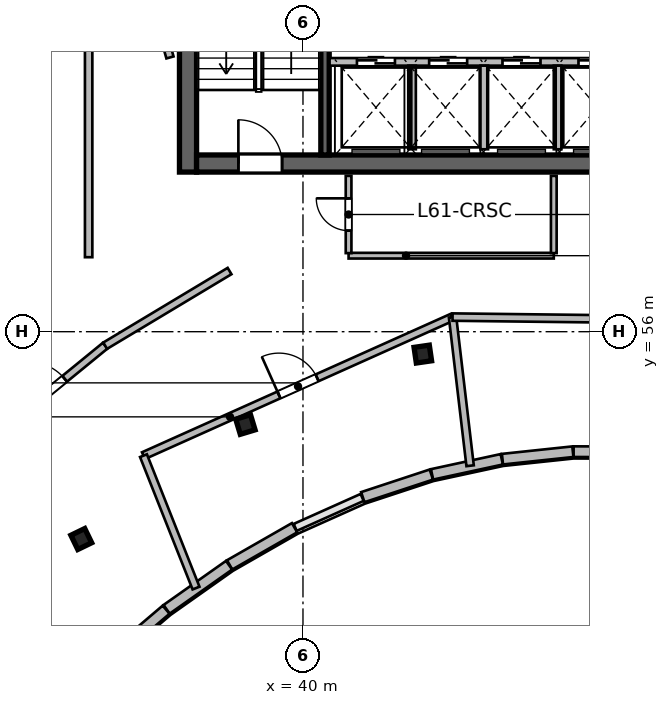
"""IFC4 building model, lengths in metres.
Left out: names, types, materials, properties, quantities, classifications, styles, units other than length and angle.
Written with IfcOpenShell. Run it as: python <this file> out.ifc"""

import sys

from ifc_helpers import new_model, si_unit, direction, frame, frame_2d, origin, origin_2d, place, context, subcontext, project, spatial, rectangle, i_section, extrude, source, transform, mapped, element, fill, save


model = new_model("IFC4")
c1 = context("Model", 3, precision=1e-05, world=origin(), true_north=direction((0.0, 1.0)))
c2 = subcontext(c1, "Body", "Model", "MODEL_VIEW")
j1 = project(units=[si_unit("LENGTHUNIT", "METRE"), si_unit("PLANEANGLEUNIT", "RADIAN")], contexts=[c1])
p1 = place(None, origin())
s1 = spatial("IfcSite", under=j1, at=p1, CompositionType="ELEMENT")
p2 = place(p1, origin())
s2 = spatial("IfcBuilding", under=s1, at=p2, CompositionType="ELEMENT")
p3 = place(p2, frame((0.0, 0.0, 250.8)))
s3 = spatial("IfcBuildingStorey", under=s2, at=p3, CompositionType="ELEMENT", Elevation=250.8)
m1 = source(origin(), c2, "Body", "SweptSolid", [
    extrude(rectangle(XDim=12.0, YDim=0.45, at=frame_2d((6.0, 0.0))), origin(), (0.0, 0.0, 1.0), 3.9),
])
p4 = place(p3, frame((36.975, 60.2, 0.0), z_axis=(0.0, 0.0, 1.0), x_axis=(0.0, 1.0, 0.0)))
e1 = element("IfcWall", 1, at=p4, inside=s3, PredefinedType="SHEAR", context=c2, shape_type="MappedRepresentation", body=[
    mapped(m1, transform((0.0, 0.0, 0.0), scale=1.0)),
])
m2 = source(origin(), c2, "Body", "SweptSolid", [
    extrude(rectangle(XDim=21.6, YDim=0.45, at=frame_2d((10.8, 0.0))), origin(), (0.0, 0.0, 1.0), 3.9),
])
p5 = place(p3, frame((37.2, 60.425, 0.0), z_axis=(0.0, 0.0, 1.0), x_axis=(1.0, 0.0, 0.0)))
e2 = element("IfcWall", 2, at=p5, inside=s3, PredefinedType="SHEAR", context=c2, shape_type="MappedRepresentation", body=[
    mapped(m2, transform((0.0, 0.0, 0.0), scale=1.0)),
])
p6 = place(p5, frame((1.1, 0.0, 0.0)))
e3 = element("IfcOpeningElement", 3, at=p6, cuts=e2, PredefinedType="OPENING", context=c2, shape_type="SweptSolid", body=[
    extrude(rectangle(XDim=1.15, YDim=2.15, at=frame_2d((0.575, 1.075))), frame((0.0, 0.235, 0.0), z_axis=(0.0, -1.0, 0.0), x_axis=(1.0, 0.0, 0.0)), (0.0, 0.0, 1.0), 0.47),
])
p7 = place(p5, frame((19.5, 0.0, 0.0)))
e4 = element("IfcOpeningElement", 4, at=p7, cuts=e2, PredefinedType="OPENING", context=c2, shape_type="SweptSolid", body=[
    extrude(rectangle(XDim=0.9, YDim=2.1, at=frame_2d((0.45, 1.05))), frame((0.0, 0.235, 0.0), z_axis=(0.0, -1.0, 0.0), x_axis=(1.0, 0.0, 0.0)), (0.0, 0.0, 1.0), 0.47),
])
p8 = place(p5, frame((12.02, 0.0, 0.0)))
e5 = element("IfcOpeningElement", 5, at=p8, cuts=e2, PredefinedType="OPENING", context=c2, shape_type="SweptSolid", body=[
    extrude(rectangle(XDim=1.6, YDim=2.15, at=frame_2d((0.8, 1.075))), frame((0.0, 0.235, 0.0), z_axis=(0.0, -1.0, 0.0), x_axis=(1.0, 0.0, 0.0)), (0.0, 0.0, 1.0), 0.47),
])
m3 = source(origin(), c2, "Body", "SweptSolid", [
    extrude(rectangle(XDim=11.1, YDim=0.22, at=frame_2d((5.55, 0.0))), origin(), (0.0, 0.0, 1.0), 3.9),
])
p9 = place(p3, frame((40.58, 60.65, 0.0), z_axis=(0.0, 0.0, 1.0), x_axis=(0.0, 1.0, 0.0)))
e6 = element("IfcWall", 6, at=p9, inside=s3, PredefinedType="SHEAR", context=c2, shape_type="MappedRepresentation", body=[
    mapped(m3, transform((0.0, 0.0, 0.0), scale=1.0)),
])
m4 = source(origin(), c2, "Body", "SweptSolid", [
    extrude(i_section(OverallWidth=0.406, OverallDepth=0.416, WebThickness=0.03, FlangeThickness=0.048, at=origin_2d()), origin(), (0.0, 0.0, 1.0), 3.9),
])
for number, where, z_axis, x_axis in (
    (7, (34.166, 50.545, 0.0), (0.0, 0.0, 1.0), (-0.436, 0.9, 0.0)),
    (8, (38.485, 53.558, 0.0), (0.0, 0.0, 1.0), (-0.289, 0.957, 0.0)),
    (9, (43.154, 55.411, 0.0), (0.0, 0.0, 1.0), (-0.143, 0.99, 0.0)),
):
    element("IfcColumn", number, at=place(p3, frame(where, z_axis=z_axis, x_axis=x_axis)), inside=s3, PredefinedType="COLUMN", context=c2, shape_type="MappedRepresentation", body=[
        mapped(m4, transform((0.0, 0.0, 0.0), scale=1.0)),
    ])
m5 = source(origin(), c2, "Body", "SweptSolid", [
    extrude(rectangle(XDim=1.858, YDim=0.28, at=frame_2d((0.929, 0.0))), origin(), (0.0, 0.0, 1.0), 3.58),
])
p10 = place(p3, frame((48.979, 52.838, 0.0), z_axis=(0.0, 0.0, 1.0), x_axis=(-0.999995433965, 0.003021928128, 0.0)))
e10 = element("IfcWall", 10, at=p10, inside=s3, PredefinedType="SOLIDWALL", context=c2, shape_type="MappedRepresentation", body=[
    mapped(m5, transform((0.0, 0.0, 0.0), scale=1.0)),
])
m6 = source(origin(), c2, "Body", "SweptSolid", [
    extrude(rectangle(XDim=1.862, YDim=0.28, at=frame_2d((0.931, 0.0))), origin(), (0.0, 0.0, 1.0), 3.58),
])
p11 = place(p3, frame((47.102, 52.842, 0.0), z_axis=(0.0, 0.0, 1.0), x_axis=(-0.994430497743, -0.1053944266, 0.0)))
e11 = element("IfcWall", 11, at=p11, inside=s3, PredefinedType="SOLIDWALL", context=c2, shape_type="MappedRepresentation", body=[
    mapped(m6, transform((0.0, 0.0, 0.0), scale=1.0)),
])
m7 = source(origin(), c2, "Body", "SweptSolid", [
    extrude(rectangle(XDim=1.877, YDim=0.28, at=frame_2d((0.938, 0.0))), origin(), (0.0, 0.0, 1.0), 3.58),
])
p12 = place(p3, frame((45.231, 52.643, 0.0), z_axis=(0.0, 0.0, 1.0), x_axis=(-0.97737202312, -0.211527606761, 0.0)))
e12 = element("IfcWall", 12, at=p12, inside=s3, PredefinedType="SOLIDWALL", context=c2, shape_type="MappedRepresentation", body=[
    mapped(m7, transform((0.0, 0.0, 0.0), scale=1.0)),
])
m8 = source(origin(), c2, "Body", "SweptSolid", [
    extrude(rectangle(XDim=1.9, YDim=0.28, at=frame_2d((0.95, 0.0))), origin(), (0.0, 0.0, 1.0), 3.58),
])
p13 = place(p3, frame((43.378, 52.241, 0.0), z_axis=(0.0, 0.0, 1.0), x_axis=(-0.949693643068, -0.313180434121, 0.0)))
e13 = element("IfcWall", 13, at=p13, inside=s3, PredefinedType="SOLIDWALL", context=c2, shape_type="MappedRepresentation", body=[
    mapped(m8, transform((0.0, 0.0, 0.0), scale=1.0)),
])
m9 = source(origin(), c2, "Body", "SweptSolid", [
    extrude(rectangle(XDim=1.969, YDim=0.28, at=frame_2d((0.984, 0.0))), origin(), (0.0, 0.0, 1.0), 3.58),
])
p14 = place(p3, frame((39.779, 50.842, 0.0), z_axis=(0.0, 0.0, 1.0), x_axis=(-0.86797594681, -0.496606238139, 0.0)))
e14 = element("IfcWall", 14, at=p14, inside=s3, PredefinedType="SOLIDWALL", context=c2, shape_type="MappedRepresentation", body=[
    mapped(m9, transform((0.0, 0.0, 0.0), scale=1.0)),
])
m10 = source(origin(), c2, "Body", "SweptSolid", [
    extrude(rectangle(XDim=2.012, YDim=0.28, at=frame_2d((1.006, 0.0))), origin(), (0.0, 0.0, 1.0), 3.58),
])
p15 = place(p3, frame((38.055, 49.855, 0.0), z_axis=(0.0, 0.0, 1.0), x_axis=(-0.817008215805, -0.576626027255, 0.0)))
e15 = element("IfcWall", 15, at=p15, inside=s3, PredefinedType="SOLIDWALL", context=c2, shape_type="MappedRepresentation", body=[
    mapped(m10, transform((0.0, 0.0, 0.0), scale=1.0)),
])
m11 = source(origin(), c2, "Body", "SweptSolid", [
    extrude(rectangle(XDim=2.06, YDim=0.28, at=frame_2d((1.03, 0.0))), origin(), (0.0, 0.0, 1.0), 3.58),
])
p16 = place(p3, frame((36.399, 48.685, 0.0), z_axis=(0.0, 0.0, 1.0), x_axis=(-0.761494573969, -0.648171284319, 0.0)))
e16 = element("IfcWall", 16, at=p16, inside=s3, PredefinedType="SOLIDWALL", context=c2, shape_type="MappedRepresentation", body=[
    mapped(m11, transform((0.0, 0.0, 0.0), scale=1.0)),
])
m12 = source(origin(), c2, "Body", "SweptSolid", [
    extrude(rectangle(XDim=8.02, YDim=0.2, at=frame_2d((4.01, 0.0))), origin(), (0.0, 0.0, 1.0), 3.58),
])
p17 = place(p3, frame((40.7, 63.1, 0.0), z_axis=(0.0, 0.0, 1.0), x_axis=(1.0, 0.0, 0.0)))
e17 = element("IfcWall", 17, at=p17, inside=s3, PredefinedType="SOLIDWALL", context=c2, shape_type="MappedRepresentation", body=[
    mapped(m12, transform((0.0, 0.0, 0.0), scale=1.0)),
])
p18 = place(p17, frame((0.72, 0.0, 0.0)))
e18 = element("IfcOpeningElement", 18, at=p18, cuts=e17, PredefinedType="OPENING", context=c2, shape_type="SweptSolid", body=[
    extrude(rectangle(XDim=1.0, YDim=2.15, at=frame_2d((0.5, 1.075))), frame((0.0, 0.11, 0.0), z_axis=(0.0, -1.0, 0.0), x_axis=(1.0, 0.0, 0.0)), (0.0, 0.0, 1.0), 0.22),
])
p19 = place(p17, frame((2.62, 0.0, 0.0)))
e19 = element("IfcOpeningElement", 19, at=p19, cuts=e17, PredefinedType="OPENING", context=c2, shape_type="SweptSolid", body=[
    extrude(rectangle(XDim=1.0, YDim=2.15, at=frame_2d((0.5, 1.075))), frame((0.0, 0.11, 0.0), z_axis=(0.0, -1.0, 0.0), x_axis=(1.0, 0.0, 0.0)), (0.0, 0.0, 1.0), 0.22),
])
p20 = place(p17, frame((4.55, 0.0, 0.0)))
e20 = element("IfcOpeningElement", 20, at=p20, cuts=e17, PredefinedType="OPENING", context=c2, shape_type="SweptSolid", body=[
    extrude(rectangle(XDim=1.0, YDim=2.15, at=frame_2d((0.5, 1.075))), frame((0.0, 0.11, 0.0), z_axis=(0.0, -1.0, 0.0), x_axis=(1.0, 0.0, 0.0)), (0.0, 0.0, 1.0), 0.22),
])
p21 = place(p17, frame((6.55, 0.0, 0.0)))
e21 = element("IfcOpeningElement", 21, at=p21, cuts=e17, PredefinedType="OPENING", context=c2, shape_type="SweptSolid", body=[
    extrude(rectangle(XDim=1.0, YDim=2.15, at=frame_2d((0.5, 1.075))), frame((0.0, 0.11, 0.0), z_axis=(0.0, -1.0, 0.0), x_axis=(1.0, 0.0, 0.0)), (0.0, 0.0, 1.0), 0.22),
])
m13 = source(origin(), c2, "Body", "SweptSolid", [
    extrude(rectangle(XDim=2.2, YDim=0.2, at=frame_2d((1.1, 0.0))), origin(), (0.0, 0.0, 1.0), 3.58),
])
for number, where, z_axis, x_axis in (
    (22, (42.87, 60.8, 0.0), (0.0, 0.0, 1.0), (0.0, 1.0, 0.0)),
    (23, (44.77, 60.8, 0.0), (0.0, 0.0, 1.0), (0.0, 1.0, 0.0)),
    (24, (46.7, 60.8, 0.0), (0.0, 0.0, 1.0), (0.0, 1.0, 0.0)),
):
    element("IfcWall", number, at=place(p3, frame(where, z_axis=z_axis, x_axis=x_axis)), inside=s3, PredefinedType="SOLIDWALL", context=c2, shape_type="MappedRepresentation", body=[
        mapped(m13, transform((0.0, 0.0, 0.0), scale=1.0)),
    ])
m14 = source(origin(), c2, "Body", "SweptSolid", [
    extrude(rectangle(XDim=5.4, YDim=0.15, at=frame_2d((2.7, 0.0))), origin(), (0.0, 0.0, 1.0), 3.58),
])
p22 = place(p3, frame((41.2, 58.0, 0.0), z_axis=(0.0, 0.0, 1.0), x_axis=(1.0, 0.0, 0.0)))
e25 = element("IfcWall", 25, at=p22, inside=s3, PredefinedType="PARTITIONING", context=c2, shape_type="MappedRepresentation", body=[
    mapped(m14, transform((0.0, 0.0, 0.0), scale=1.0)),
])
m15 = source(origin(), c2, "Body", "SweptSolid", [
    extrude(rectangle(XDim=2.033, YDim=0.15, at=frame_2d((1.016, 0.0))), origin(), (0.0, 0.0, 1.0), 3.58),
])
p23 = place(p3, frame((41.2, 58.067, 0.0), z_axis=(0.0, 0.0, 1.0), x_axis=(0.0, 1.0, 0.0)))
e26 = element("IfcWall", 26, at=p23, inside=s3, PredefinedType="PARTITIONING", context=c2, shape_type="MappedRepresentation", body=[
    mapped(m15, transform((0.0, 0.0, 0.0), scale=1.0)),
])
p24 = place(p23, frame((0.591, 0.0, 0.0)))
e27 = element("IfcOpeningElement", 27, at=p24, cuts=e26, PredefinedType="OPENING", context=c2, shape_type="SweptSolid", body=[
    extrude(rectangle(XDim=0.85, YDim=2.1, at=frame_2d((0.425, 1.05))), frame((0.0, 0.085, 0.0), z_axis=(0.0, -1.0, 0.0), x_axis=(1.0, 0.0, 0.0)), (0.0, 0.0, 1.0), 0.17),
])
p25 = place(p3, frame((46.6, 58.067, 0.0), z_axis=(0.0, 0.0, 1.0), x_axis=(0.0, 1.0, 0.0)))
e28 = element("IfcWall", 28, at=p25, inside=s3, PredefinedType="PARTITIONING", context=c2, shape_type="MappedRepresentation", body=[
    mapped(m15, transform((0.0, 0.0, 0.0), scale=1.0)),
])
m16 = source(origin(), c2, "Body", "SweptSolid", [
    extrude(rectangle(XDim=8.913, YDim=0.195, at=frame_2d((4.457, 0.0))), origin(), (0.0, 0.0, 1.0), 3.58),
])
p26 = place(p3, frame((35.803, 52.738, 0.0), z_axis=(0.0, 0.0, 1.0), x_axis=(0.912488521546, 0.409102307555, 0.0)))
e29 = element("IfcWall", 29, at=p26, inside=s3, PredefinedType="PARTITIONING", context=c2, shape_type="MappedRepresentation", body=[
    mapped(m16, transform((0.0, 0.0, 0.0), scale=1.0)),
])
p27 = place(p26, frame((3.906, 0.0, 0.0)))
e30 = element("IfcOpeningElement", 30, at=p27, cuts=e29, PredefinedType="OPENING", context=c2, shape_type="SweptSolid", body=[
    extrude(rectangle(XDim=1.1, YDim=2.15, at=frame_2d((0.55, 1.075))), frame((0.0, 0.107, 0.0), z_axis=(0.0, -1.0, 0.0), x_axis=(1.0, 0.0, 0.0)), (0.0, 0.0, 1.0), 0.215),
])
m17 = source(origin(), c2, "Body", "SweptSolid", [
    extrude(rectangle(XDim=3.749, YDim=0.195, at=frame_2d((1.875, 0.0))), origin(), (0.0, 0.0, 1.0), 3.58),
])
p28 = place(p3, frame((37.186, 49.254, 0.0), z_axis=(0.0, 0.0, 1.0), x_axis=(-0.368851771682, 0.92948823044, 0.0)))
e31 = element("IfcWall", 31, at=p28, inside=s3, PredefinedType="PARTITIONING", context=c2, shape_type="MappedRepresentation", body=[
    mapped(m17, transform((0.0, 0.0, 0.0), scale=1.0)),
])
m18 = source(origin(), c2, "Body", "SweptSolid", [
    extrude(rectangle(XDim=3.939, YDim=0.195, at=frame_2d((1.969, 0.0))), origin(), (0.0, 0.0, 1.0), 3.58),
])
p29 = place(p3, frame((44.398, 52.473, 0.0), z_axis=(0.0, 0.0, 1.0), x_axis=(-0.117395053494, 0.993085294129, 0.0)))
e32 = element("IfcWall", 32, at=p29, inside=s3, PredefinedType="PARTITIONING", context=c2, shape_type="MappedRepresentation", body=[
    mapped(m18, transform((0.0, 0.0, 0.0), scale=1.0)),
])
m19 = source(origin(), c2, "Body", "SweptSolid", [
    extrude(rectangle(XDim=8.576, YDim=0.195, at=frame_2d((4.288, 0.0))), origin(), (0.0, 0.0, 1.0), 3.58),
])
p30 = place(p3, frame((43.936, 56.385, 0.0), z_axis=(0.0, 0.0, 1.0), x_axis=(0.999931553434, -0.011699933624, 0.0)))
e33 = element("IfcWall", 33, at=p30, inside=s3, PredefinedType="PARTITIONING", context=c2, shape_type="MappedRepresentation", body=[
    mapped(m19, transform((0.0, 0.0, 0.0), scale=1.0)),
])
p31 = place(p30, frame((4.488, 0.0, 0.0)))
e34 = element("IfcOpeningElement", 34, at=p31, cuts=e33, PredefinedType="OPENING", context=c2, shape_type="SweptSolid", body=[
    extrude(rectangle(XDim=1.1, YDim=2.15, at=frame_2d((0.55, 1.075))), frame((0.0, 0.107, 0.0), z_axis=(0.0, -1.0, 0.0), x_axis=(1.0, 0.0, 0.0)), (0.0, 0.0, 1.0), 0.215),
])
m20 = source(origin(), c2, "Body", "SweptSolid", [
    extrude(rectangle(XDim=3.954, YDim=0.195, at=frame_2d((1.977, 0.0))), origin(), (0.0, 0.0, 1.0), 3.58),
])
p32 = place(p3, frame((31.733, 53.13, 0.0), z_axis=(0.0, 0.0, 1.0), x_axis=(0.774345047596, 0.632763579281, 0.0)))
e35 = element("IfcWall", 35, at=p32, inside=s3, PredefinedType="PARTITIONING", context=c2, shape_type="MappedRepresentation", body=[
    mapped(m20, transform((0.0, 0.0, 0.0), scale=1.0)),
])
p33 = place(p32, frame((1.377, 0.0, 0.0)))
e36 = element("IfcOpeningElement", 36, at=p33, cuts=e35, PredefinedType="OPENING", context=c2, shape_type="SweptSolid", body=[
    extrude(rectangle(XDim=1.2, YDim=2.15, at=frame_2d((0.6, 1.075))), frame((0.0, 0.107, 0.0), z_axis=(0.0, -1.0, 0.0), x_axis=(1.0, 0.0, 0.0)), (0.0, 0.0, 1.0), 0.215),
])
m21 = source(origin(), c2, "Body", "SweptSolid", [
    extrude(rectangle(XDim=3.817, YDim=0.195, at=frame_2d((1.909, 0.0))), origin(), (0.0, 0.0, 1.0), 3.58),
])
p34 = place(p3, frame((34.795, 55.632, 0.0), z_axis=(0.0, 0.0, 1.0), x_axis=(0.857453418218, 0.514561595522, 0.0)))
e37 = element("IfcWall", 37, at=p34, inside=s3, PredefinedType="PARTITIONING", context=c2, shape_type="MappedRepresentation", body=[
    mapped(m21, transform((0.0, 0.0, 0.0), scale=1.0)),
])
m22 = source(origin(), c2, "Body", "SweptSolid", [
    extrude(rectangle(XDim=13.169, YDim=0.195, at=frame_2d((6.585, 0.0))), origin(), (0.0, 0.0, 1.0), 3.58),
])
p35 = place(p3, frame((36.5, 63.216, 0.0), z_axis=(0.0, 0.0, 1.0), x_axis=(-0.26875376985, 0.963208913576, 0.0)))
e38 = element("IfcWall", 38, at=p35, inside=s3, PredefinedType="PARTITIONING", context=c2, shape_type="MappedRepresentation", body=[
    mapped(m22, transform((0.0, 0.0, 0.0), scale=1.0)),
])
m23 = source(origin(), c2, "Body", "SweptSolid", [
    extrude(rectangle(XDim=18.567, YDim=0.195, at=frame_2d((9.284, 0.0))), origin(), (0.0, 0.0, 1.0), 3.58),
])
p36 = place(p3, frame((34.36, 57.96, 0.0), z_axis=(0.0, 0.0, 1.0), x_axis=(0.0, 1.0, 0.0)))
e39 = element("IfcWall", 39, at=p36, inside=s3, PredefinedType="PARTITIONING", context=c2, shape_type="MappedRepresentation", body=[
    mapped(m23, transform((0.0, 0.0, 0.0), scale=1.0)),
])
m24 = source(origin(), c2, "Body", "SweptSolid", [
    extrude(rectangle(XDim=1.15, YDim=2.15, at=frame_2d((0.575, 1.075))), frame((0.0, 0.025, 0.0), z_axis=(0.0, -1.0, 0.0), x_axis=(1.0, 0.0, 0.0)), (0.0, 0.0, 1.0), 0.05),
])
p37 = place(p6, origin())
e40 = element("IfcDoor", 40, at=p37, inside=s3, OperationType="SINGLE_SWING_LEFT", PredefinedType="DOOR", context=c2, shape_type="MappedRepresentation", body=[
    mapped(m24, transform((0.0, 0.0, 0.0), scale=1.0)),
])
fill(e3, e40)
m25 = source(origin(), c2, "Body", "SweptSolid", [
    extrude(rectangle(XDim=1.0, YDim=2.15, at=frame_2d((0.5, 1.075))), frame((0.0, 0.025, 0.0), z_axis=(0.0, -1.0, 0.0), x_axis=(1.0, 0.0, 0.0)), (0.0, 0.0, 1.0), 0.05),
])
p38 = place(p18, origin())
e41 = element("IfcDoor", 41, at=p38, inside=s3, OperationType="DOUBLE_DOOR_SLIDING", PredefinedType="DOOR", context=c2, shape_type="MappedRepresentation", body=[
    mapped(m25, transform((0.0, 0.0, 0.0), scale=1.0)),
])
fill(e18, e41)
p39 = place(p19, origin())
e42 = element("IfcDoor", 42, at=p39, inside=s3, OperationType="DOUBLE_DOOR_SLIDING", PredefinedType="DOOR", context=c2, shape_type="MappedRepresentation", body=[
    mapped(m25, transform((0.0, 0.0, 0.0), scale=1.0)),
])
fill(e19, e42)
p40 = place(p20, origin())
e43 = element("IfcDoor", 43, at=p40, inside=s3, OperationType="DOUBLE_DOOR_SLIDING", PredefinedType="DOOR", context=c2, shape_type="MappedRepresentation", body=[
    mapped(m25, transform((0.0, 0.0, 0.0), scale=1.0)),
])
fill(e20, e43)
p41 = place(p21, origin())
e44 = element("IfcDoor", 44, at=p41, inside=s3, OperationType="DOUBLE_DOOR_SLIDING", PredefinedType="DOOR", context=c2, shape_type="MappedRepresentation", body=[
    mapped(m25, transform((0.0, 0.0, 0.0), scale=1.0)),
])
fill(e21, e44)
m26 = source(origin(), c2, "Body", "SweptSolid", [
    extrude(rectangle(XDim=0.85, YDim=2.1, at=frame_2d((0.425, 1.05))), frame((0.0, 0.025, 0.0), z_axis=(0.0, -1.0, 0.0), x_axis=(1.0, 0.0, 0.0)), (0.0, 0.0, 1.0), 0.05),
])
p42 = place(p24, origin())
e45 = element("IfcDoor", 45, at=p42, inside=s3, OperationType="SINGLE_SWING_RIGHT", PredefinedType="DOOR", context=c2, shape_type="MappedRepresentation", body=[
    mapped(m26, transform((0.0, 0.0, 0.0), scale=1.0)),
])
fill(e27, e45)
m27 = source(origin(), c2, "Body", "SweptSolid", [
    extrude(rectangle(XDim=1.1, YDim=2.15, at=frame_2d((0.55, 1.075))), frame((0.0, 0.025, 0.0), z_axis=(0.0, -1.0, 0.0), x_axis=(1.0, 0.0, 0.0)), (0.0, 0.0, 1.0), 0.05),
])
p43 = place(p27, origin())
e46 = element("IfcDoor", 46, at=p43, inside=s3, OperationType="SINGLE_SWING_LEFT", PredefinedType="DOOR", context=c2, shape_type="MappedRepresentation", body=[
    mapped(m27, transform((0.0, 0.0, 0.0), scale=1.0)),
])
fill(e30, e46)
m28 = source(origin(), c2, "Body", "SweptSolid", [
    extrude(rectangle(XDim=1.2, YDim=2.15, at=frame_2d((0.6, 1.075))), frame((0.0, 0.025, 0.0), z_axis=(0.0, -1.0, 0.0), x_axis=(1.0, 0.0, 0.0)), (0.0, 0.0, 1.0), 0.05),
])
p44 = place(p33, origin())
e47 = element("IfcDoor", 47, at=p44, inside=s3, OperationType="SINGLE_SWING_LEFT", PredefinedType="DOOR", context=c2, shape_type="MappedRepresentation", body=[
    mapped(m28, transform((0.0, 0.0, 0.0), scale=1.0)),
])
fill(e36, e47)
save(model, sys.argv[1])
